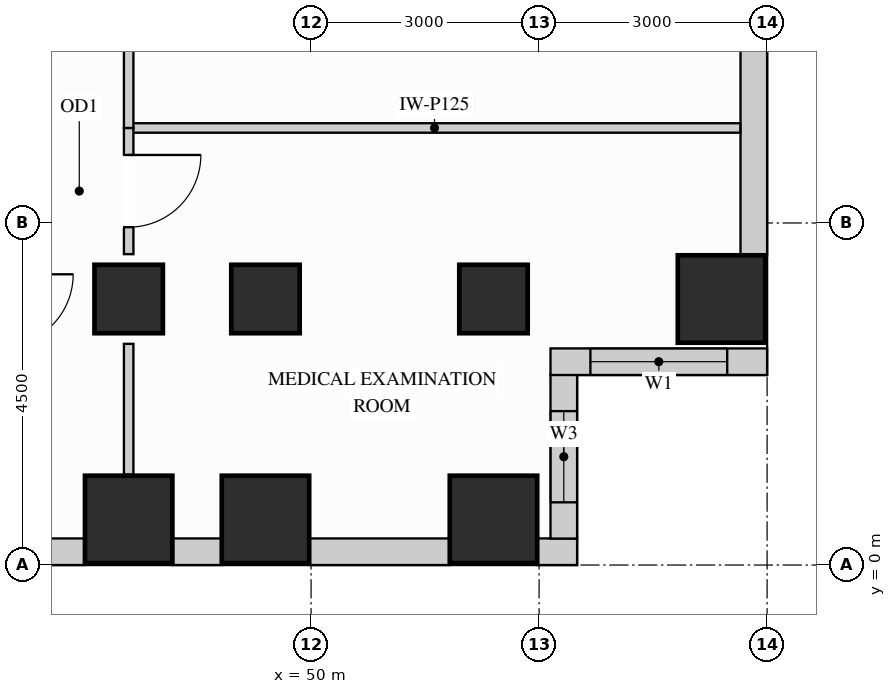
"""IFC4 building model, lengths in metres.
Left out: names, types, materials, properties, quantities, classifications, styles, units other than length and angle.
Written with IfcOpenShell. Run it as: python <this file> out.ifc"""

import sys

from ifc_helpers import new_model, si_unit, direction, frame, frame_2d, origin, origin_2d, place, context, subcontext, project, spatial, rectangle, extrude, source, transform, mapped, element, fill, save


model = new_model("IFC4")
c1 = context("Model", 3, precision=1e-05, world=origin(), true_north=direction((0.0, 1.0)))
c2 = subcontext(c1, "Body", "Model", "MODEL_VIEW")
j1 = project(units=[si_unit("LENGTHUNIT", "METRE"), si_unit("PLANEANGLEUNIT", "RADIAN")], contexts=[c1])
p1 = place(None, origin())
s1 = spatial("IfcSite", under=j1, at=p1, CompositionType="ELEMENT")
p2 = place(p1, origin())
s2 = spatial("IfcBuilding", under=s1, at=p2, CompositionType="ELEMENT")
p3 = place(p2, frame((0.0, 0.0, 91.8)))
s3 = spatial("IfcBuildingStorey", under=s2, at=p3, CompositionType="ELEMENT", Elevation=91.8)
m1 = source(origin(), c2, "Body", "SweptSolid", [
    extrude(rectangle(XDim=0.9, YDim=0.9, at=origin_2d()), origin(), (0.0, 0.0, 1.0), 3.38),
])
for number, where, z_axis, x_axis in (
    (1, (47.6, 3.5, 0.0), (0.0, 0.0, 1.0), (1.0, 0.0, 0.0)),
    (2, (49.4, 3.5, 0.0), (0.0, 0.0, 1.0), (1.0, 0.0, 0.0)),
    (3, (52.4, 3.5, 0.0), (0.0, 0.0, 1.0), (1.0, 0.0, 0.0)),
):
    element("IfcColumn", number, at=place(p3, frame(where, z_axis=z_axis, x_axis=x_axis)), inside=s3, PredefinedType="COLUMN", context=c2, shape_type="MappedRepresentation", body=[
        mapped(m1, transform((0.0, 0.0, 0.0), x_axis=(1.0, 0.0, 0.0), y_axis=(0.0, 1.0, 0.0), z_axis=(0.0, 0.0, 1.0))),
    ])
m2 = source(origin(), c2, "Body", "SweptSolid", [
    extrude(rectangle(XDim=1.15, YDim=1.15, at=origin_2d()), origin(), (0.0, 0.0, 1.0), 3.38),
])
for number, where, z_axis, x_axis in (
    (4, (55.4, 3.5, 0.0), (0.0, 0.0, 1.0), (1.0, 0.0, 0.0)),
    (5, (47.6, 0.6, 0.0), (0.0, 0.0, 1.0), (1.0, 0.0, 0.0)),
    (6, (49.4, 0.6, 0.0), (0.0, 0.0, 1.0), (1.0, 0.0, 0.0)),
    (7, (52.4, 0.6, 0.0), (0.0, 0.0, 1.0), (1.0, 0.0, 0.0)),
):
    element("IfcColumn", number, at=place(p3, frame(where, z_axis=z_axis, x_axis=x_axis)), inside=s3, PredefinedType="COLUMN", context=c2, shape_type="MappedRepresentation", body=[
        mapped(m2, transform((0.0, 0.0, 0.0), x_axis=(1.0, 0.0, 0.0), y_axis=(0.0, 1.0, 0.0), z_axis=(0.0, 0.0, 1.0))),
    ])
p4 = place(p3, frame((40.573, 0.175, 0.0), z_axis=(0.0, 0.0, 1.0), x_axis=(1.0, 0.0, 0.0)))
e8 = element("IfcWall", 8, at=p4, inside=s3, PredefinedType="SOLIDWALL", context=c2, shape_type="SweptSolid", body=[
    extrude(rectangle(XDim=6.454, YDim=0.35, at=frame_2d((3.227, 0.0))), origin(), (0.0, 0.0, 1.0), 3.365),
])
p5 = place(p4, frame((0.712, 0.0, 0.78)))
e9 = element("IfcOpeningElement", 9, at=p5, cuts=e8, PredefinedType="OPENING", context=c2, shape_type="SweptSolid", body=[
    extrude(rectangle(XDim=1.8, YDim=2.1, at=frame_2d((0.9, 1.05))), frame((0.0, 0.185, 0.0), z_axis=(0.0, -1.0, 0.0), x_axis=(1.0, 0.0, 0.0)), (0.0, 0.0, 1.0), 0.37),
])
p6 = place(p4, frame((2.905, 0.0, 0.78)))
e10 = element("IfcOpeningElement", 10, at=p6, cuts=e8, PredefinedType="OPENING", context=c2, shape_type="SweptSolid", body=[
    extrude(rectangle(XDim=1.8, YDim=2.1, at=frame_2d((0.9, 1.05))), frame((0.0, 0.185, 0.0), z_axis=(0.0, -1.0, 0.0), x_axis=(1.0, 0.0, 0.0)), (0.0, 0.0, 1.0), 0.37),
])
m3 = source(origin(), c2, "Body", "SweptSolid", [
    extrude(rectangle(XDim=0.654, YDim=0.35, at=frame_2d((0.327, 0.0))), origin(), (0.0, 0.0, 1.0), 3.365),
])
p7 = place(p3, frame((48.173, 0.175, 0.0), z_axis=(0.0, 0.0, 1.0), x_axis=(1.0, 0.0, 0.0)))
e11 = element("IfcWall", 11, at=p7, inside=s3, PredefinedType="SOLIDWALL", context=c2, shape_type="MappedRepresentation", body=[
    mapped(m3, transform((0.0, 0.0, 0.0), x_axis=(1.0, 0.0, 0.0), y_axis=(0.0, 1.0, 0.0), z_axis=(0.0, 0.0, 1.0))),
])
m4 = source(origin(), c2, "Body", "SweptSolid", [
    extrude(rectangle(XDim=1.854, YDim=0.35, at=frame_2d((0.927, 0.0))), origin(), (0.0, 0.0, 1.0), 3.365),
])
p8 = place(p3, frame((49.973, 0.175, 0.0), z_axis=(0.0, 0.0, 1.0), x_axis=(1.0, 0.0, 0.0)))
e12 = element("IfcWall", 12, at=p8, inside=s3, PredefinedType="SOLIDWALL", context=c2, shape_type="MappedRepresentation", body=[
    mapped(m4, transform((0.0, 0.0, 0.0), x_axis=(1.0, 0.0, 0.0), y_axis=(0.0, 1.0, 0.0), z_axis=(0.0, 0.0, 1.0))),
])
m5 = source(origin(), c2, "Body", "SweptSolid", [
    extrude(rectangle(XDim=0.527, YDim=0.35, at=frame_2d((0.264, 0.0))), origin(), (0.0, 0.0, 1.0), 3.365),
])
p9 = place(p3, frame((52.973, 0.175, 0.0), z_axis=(0.0, 0.0, 1.0), x_axis=(1.0, 0.0, 0.0)))
e13 = element("IfcWall", 13, at=p9, inside=s3, PredefinedType="SOLIDWALL", context=c2, shape_type="MappedRepresentation", body=[
    mapped(m5, transform((0.0, 0.0, 0.0), x_axis=(1.0, 0.0, 0.0), y_axis=(0.0, 1.0, 0.0), z_axis=(0.0, 0.0, 1.0))),
])
p10 = place(p3, frame((53.325, 0.348, 0.0), z_axis=(0.0, 0.0, 1.0), x_axis=(0.0, 1.0, 0.0)))
e14 = element("IfcWall", 14, at=p10, inside=s3, PredefinedType="SOLIDWALL", context=c2, shape_type="SweptSolid", body=[
    extrude(rectangle(XDim=2.154, YDim=0.35, at=frame_2d((1.077, 0.0))), origin(), (0.0, 0.0, 1.0), 3.365),
])
p11 = place(p10, frame((0.477, 0.0, 0.78)))
e15 = element("IfcOpeningElement", 15, at=p11, cuts=e14, PredefinedType="OPENING", context=c2, shape_type="SweptSolid", body=[
    extrude(rectangle(XDim=1.2, YDim=2.1, at=frame_2d((0.6, 1.05))), frame((0.0, 0.185, 0.0), z_axis=(0.0, -1.0, 0.0), x_axis=(1.0, 0.0, 0.0)), (0.0, 0.0, 1.0), 0.37),
])
p12 = place(p3, frame((53.15, 2.675, 0.0), z_axis=(0.0, 0.0, 1.0), x_axis=(1.0, 0.0, 0.0)))
e16 = element("IfcWall", 16, at=p12, inside=s3, PredefinedType="SOLIDWALL", context=c2, shape_type="SweptSolid", body=[
    extrude(rectangle(XDim=2.85, YDim=0.35, at=frame_2d((1.425, 0.0))), origin(), (0.0, 0.0, 1.0), 3.365),
])
p13 = place(p12, frame((0.525, 0.0, 0.78)))
e17 = element("IfcOpeningElement", 17, at=p13, cuts=e16, PredefinedType="OPENING", context=c2, shape_type="SweptSolid", body=[
    extrude(rectangle(XDim=1.8, YDim=2.1, at=frame_2d((0.9, 1.05))), frame((0.0, 0.185, 0.0), z_axis=(0.0, -1.0, 0.0), x_axis=(1.0, 0.0, 0.0)), (0.0, 0.0, 1.0), 0.37),
])
m6 = source(origin(), c2, "Body", "SweptSolid", [
    extrude(rectangle(XDim=3.354, YDim=0.35, at=frame_2d((1.677, 0.0))), origin(), (0.0, 0.0, 1.0), 3.365),
])
p14 = place(p3, frame((55.825, 4.073, 0.0), z_axis=(0.0, 0.0, 1.0), x_axis=(0.0, 1.0, 0.0)))
e18 = element("IfcWall", 18, at=p14, inside=s3, PredefinedType="SOLIDWALL", context=c2, shape_type="MappedRepresentation", body=[
    mapped(m6, transform((0.0, 0.0, 0.0), x_axis=(1.0, 0.0, 0.0), y_axis=(0.0, 1.0, 0.0), z_axis=(0.0, 0.0, 1.0))),
])
m7 = source(origin(), c2, "Body", "SweptSolid", [
    extrude(rectangle(XDim=8.048, YDim=0.125, at=frame_2d((4.024, 0.0))), origin(), (0.0, 0.0, 1.0), 3.365),
])
p15 = place(p3, frame((47.6, 5.75, 0.0), z_axis=(0.0, 0.0, 1.0), x_axis=(1.0, 0.0, 0.0)))
e19 = element("IfcWall", 19, at=p15, inside=s3, PredefinedType="PARTITIONING", context=c2, shape_type="MappedRepresentation", body=[
    mapped(m7, transform((0.0, 0.0, 0.0), x_axis=(1.0, 0.0, 0.0), y_axis=(0.0, 1.0, 0.0), z_axis=(0.0, 0.0, 1.0))),
])
p16 = place(p3, frame((47.6, 4.09, 0.0), z_axis=(0.0, 0.0, 1.0), x_axis=(0.0, 1.0, 0.0)))
e20 = element("IfcWall", 20, at=p16, inside=s3, PredefinedType="PARTITIONING", context=c2, shape_type="SweptSolid", body=[
    extrude(rectangle(XDim=1.66, YDim=0.125, at=frame_2d((0.83, 0.0))), origin(), (0.0, 0.0, 1.0), 2.677),
])
p17 = place(p16, frame((0.355, 0.0, 0.0)))
e21 = element("IfcOpeningElement", 21, at=p17, cuts=e20, PredefinedType="OPENING", context=c2, shape_type="SweptSolid", body=[
    extrude(rectangle(XDim=0.95, YDim=2.15, at=frame_2d((0.475, 1.075))), frame((0.0, 0.073, 0.0), z_axis=(0.0, -1.0, 0.0), x_axis=(1.0, 0.0, 0.0)), (0.0, 0.0, 1.0), 0.145),
])
m8 = source(origin(), c2, "Body", "SweptSolid", [
    extrude(rectangle(XDim=1.72, YDim=0.125, at=frame_2d((0.86, 0.0))), origin(), (0.0, 0.0, 1.0), 2.677),
])
p18 = place(p3, frame((47.6, 1.19, 0.0), z_axis=(0.0, 0.0, 1.0), x_axis=(0.0, 1.0, 0.0)))
e22 = element("IfcWall", 22, at=p18, inside=s3, PredefinedType="PARTITIONING", context=c2, shape_type="MappedRepresentation", body=[
    mapped(m8, transform((0.0, 0.0, 0.0), x_axis=(1.0, 0.0, 0.0), y_axis=(0.0, 1.0, 0.0), z_axis=(0.0, 0.0, 1.0))),
])
m9 = source(origin(), c2, "Body", "SweptSolid", [
    extrude(rectangle(XDim=1.66, YDim=0.125, at=frame_2d((0.83, 0.0))), origin(), (0.0, 0.0, 1.0), 2.677),
])
p19 = place(p3, frame((47.6, 5.75, 0.0), z_axis=(0.0, 0.0, 1.0), x_axis=(0.0, 1.0, 0.0)))
e23 = element("IfcWall", 23, at=p19, inside=s3, PredefinedType="PARTITIONING", context=c2, shape_type="MappedRepresentation", body=[
    mapped(m9, transform((0.0, 0.0, 0.0), x_axis=(1.0, 0.0, 0.0), y_axis=(0.0, 1.0, 0.0), z_axis=(0.0, 0.0, 1.0))),
])
m10 = source(origin(), c2, "Body", "SweptSolid", [
    extrude(rectangle(XDim=0.95, YDim=2.15, at=frame_2d((0.475, 1.075))), frame((0.0, 0.025, 0.0), z_axis=(0.0, -1.0, 0.0), x_axis=(1.0, 0.0, 0.0)), (0.0, 0.0, 1.0), 0.05),
])
p20 = place(p17, origin())
e24 = element("IfcDoor", 24, at=p20, inside=s3, OperationType="SINGLE_SWING_RIGHT", PredefinedType="DOOR", context=c2, shape_type="MappedRepresentation", body=[
    mapped(m10, transform((0.0, 0.0, 0.0), x_axis=(1.0, 0.0, 0.0), y_axis=(0.0, 1.0, 0.0), z_axis=(0.0, 0.0, 1.0))),
])
fill(e21, e24)
m11 = source(origin(), c2, "Body", "SweptSolid", [
    extrude(rectangle(XDim=1.8, YDim=2.1, at=frame_2d((0.9, 1.05))), frame((0.0, 0.03, 0.0), z_axis=(0.0, -1.0, 0.0), x_axis=(1.0, 0.0, 0.0)), (0.0, 0.0, 1.0), 0.06),
])
p21 = place(p13, origin())
e25 = element("IfcWindow", 25, at=p21, inside=s3, PartitioningType="SINGLE_PANEL", PredefinedType="WINDOW", context=c2, shape_type="MappedRepresentation", body=[
    mapped(m11, transform((0.0, 0.0, 0.0), x_axis=(1.0, 0.0, 0.0), y_axis=(0.0, 1.0, 0.0), z_axis=(0.0, 0.0, 1.0))),
])
fill(e17, e25)
m12 = source(origin(), c2, "Body", "SweptSolid", [
    extrude(rectangle(XDim=1.2, YDim=2.1, at=frame_2d((0.6, 1.05))), frame((0.0, 0.03, 0.0), z_axis=(0.0, -1.0, 0.0), x_axis=(1.0, 0.0, 0.0)), (0.0, 0.0, 1.0), 0.06),
])
p22 = place(p11, origin())
e26 = element("IfcWindow", 26, at=p22, inside=s3, PartitioningType="SINGLE_PANEL", PredefinedType="WINDOW", context=c2, shape_type="MappedRepresentation", body=[
    mapped(m12, transform((0.0, 0.0, 0.0), x_axis=(1.0, 0.0, 0.0), y_axis=(0.0, 1.0, 0.0), z_axis=(0.0, 0.0, 1.0))),
])
fill(e15, e26)
save(model, sys.argv[1])
